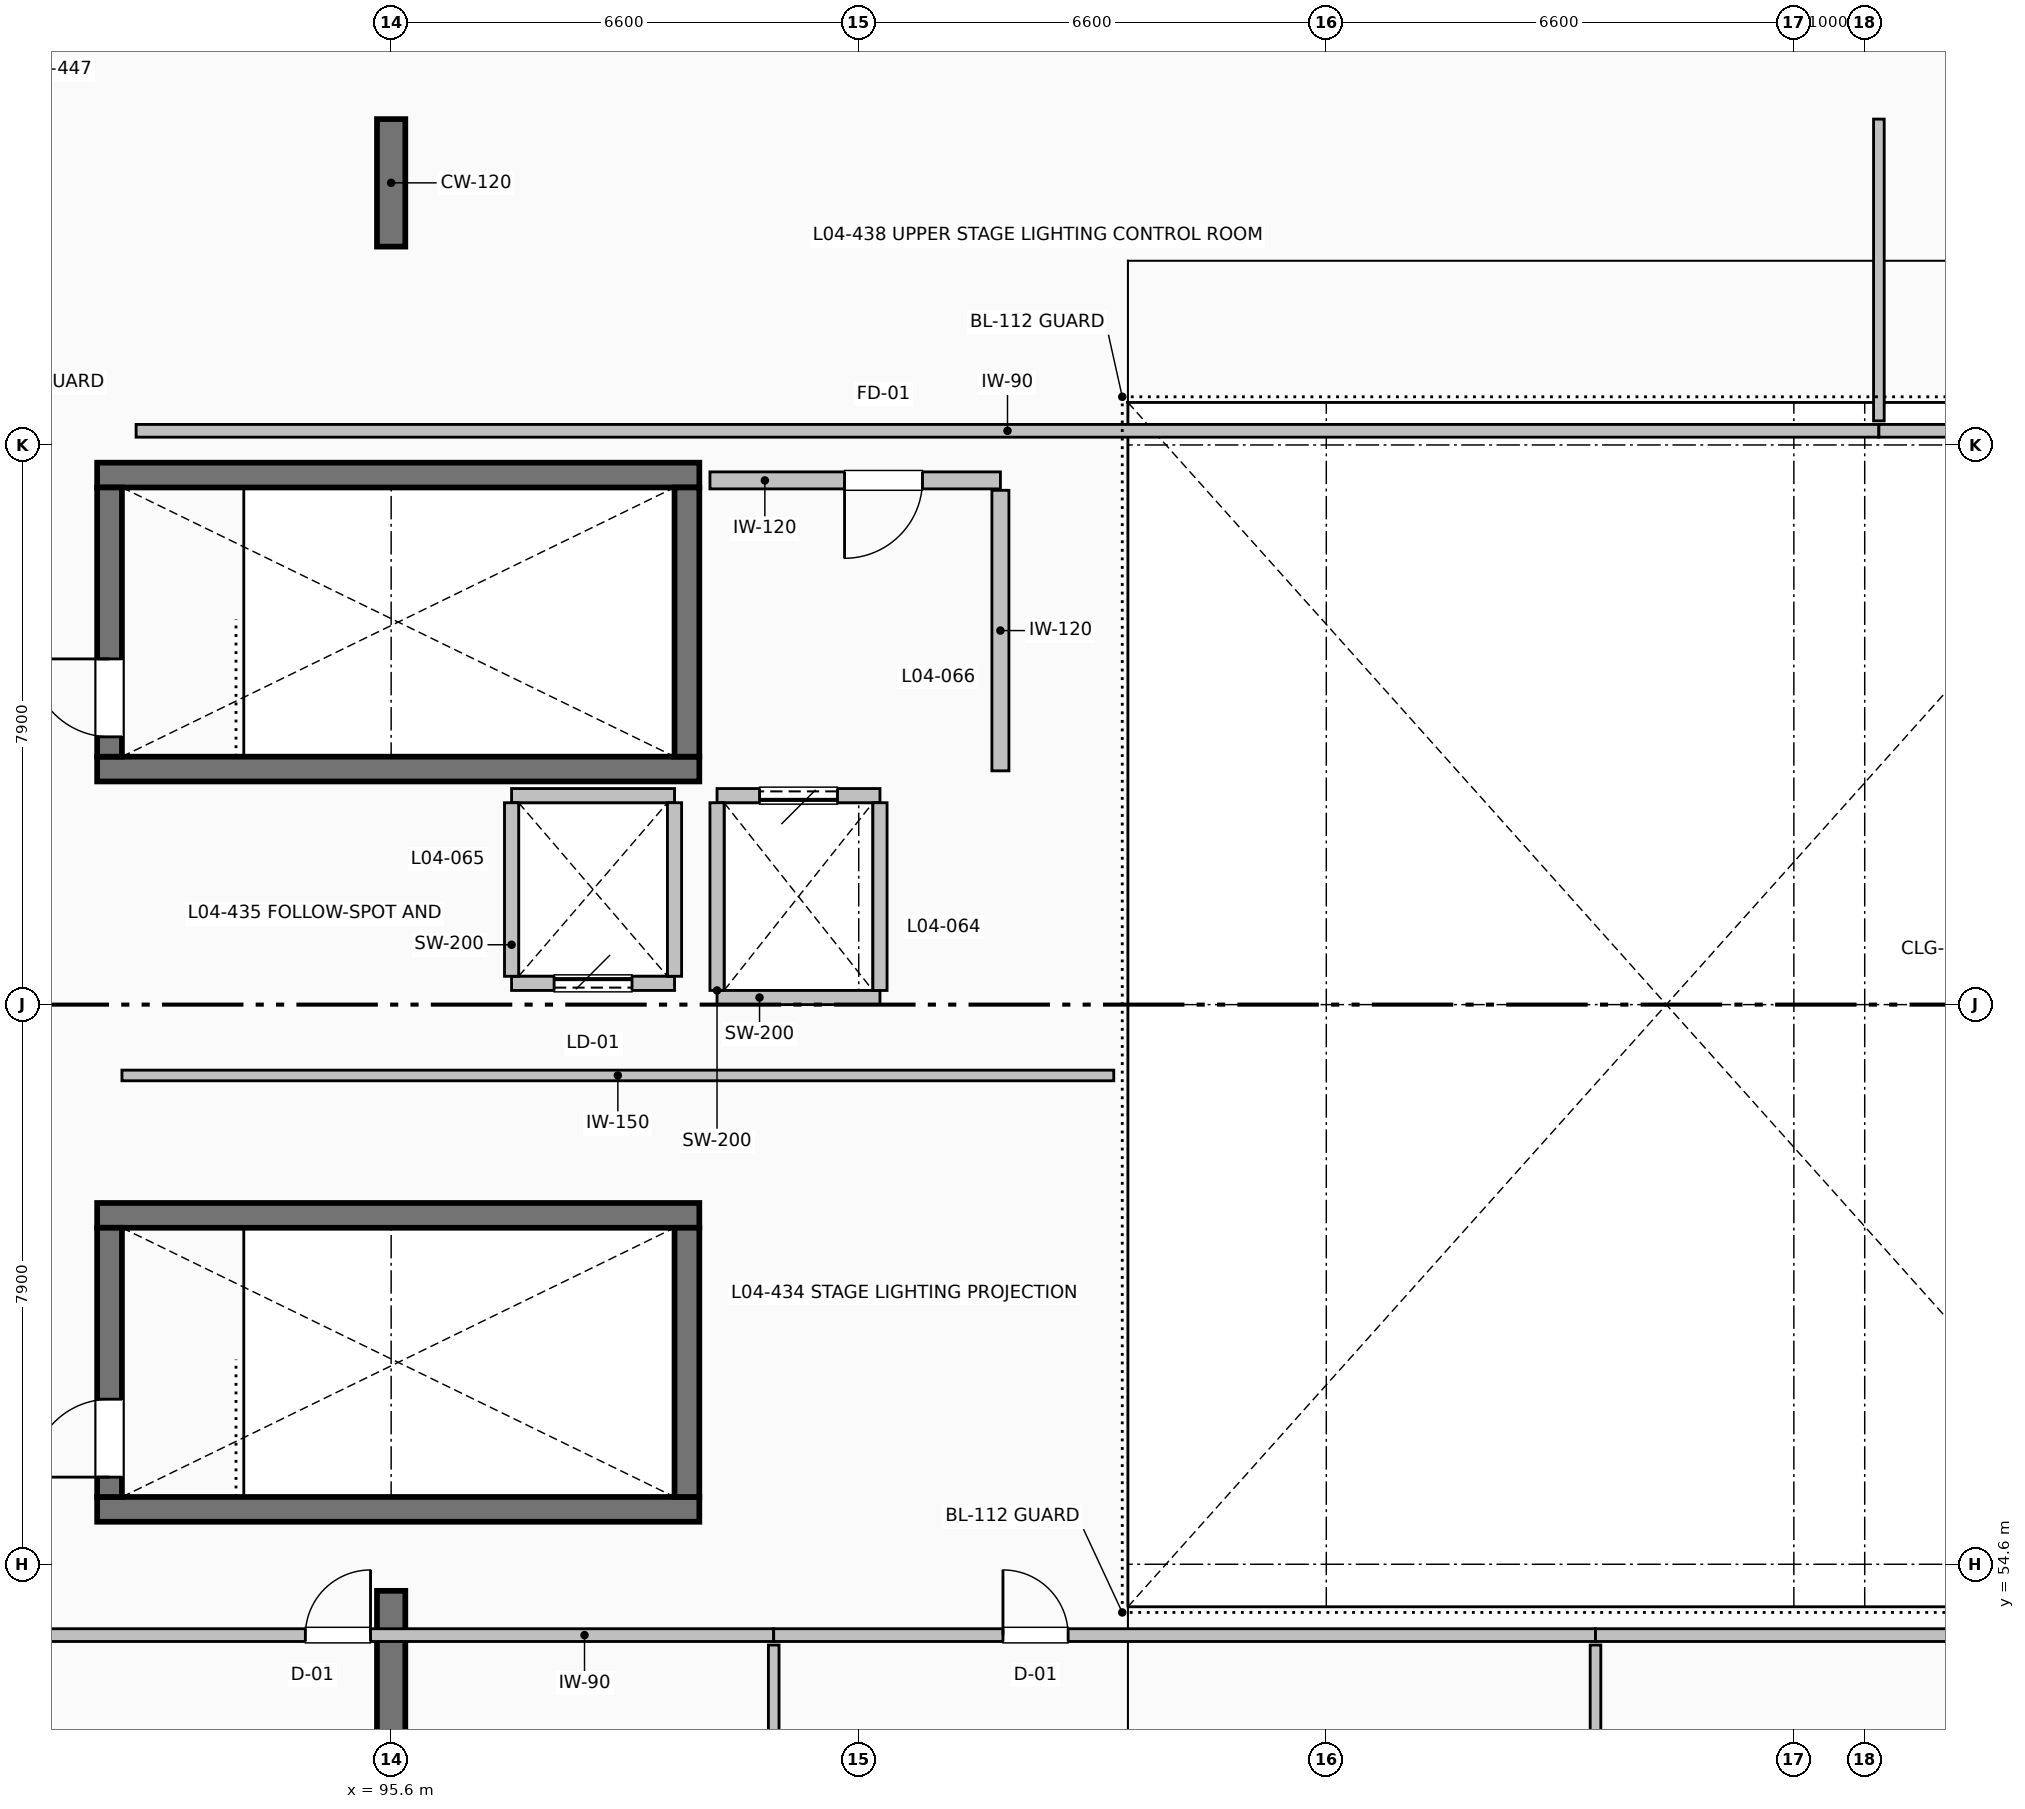
"""IFC4 building model, lengths in metres.
Left out: names, types, materials, properties, quantities, classifications, styles, units other than length and angle.
Written with IfcOpenShell. Run it as: python <this file> out.ifc"""

import sys

from ifc_helpers import new_model, si_unit, direction, frame, frame_2d, origin, place, context, subcontext, project, spatial, rectangle, extrude, element, fill, save


model = new_model("IFC4")
c1 = context("Model", 3, precision=1e-05, world=origin(), true_north=direction((0.0, 1.0)))
c2 = subcontext(c1, "Body", "Model", "MODEL_VIEW")
j1 = project(units=[si_unit("LENGTHUNIT", "METRE"), si_unit("PLANEANGLEUNIT", "RADIAN")], contexts=[c1])
p1 = place(None, origin())
s1 = spatial("IfcSite", under=j1, at=p1, CompositionType="ELEMENT")
p2 = place(p1, origin())
s2 = spatial("IfcBuilding", under=s1, at=p2, CompositionType="ELEMENT")
p3 = place(p2, frame((0.0, 0.0, 19.5)))
s3 = spatial("IfcBuildingStorey", under=s2, at=p3, CompositionType="ELEMENT", Elevation=19.5)
for number, where, z_axis, x_axis in (
    (1, (91.45, 65.825, 0.0), (0.0, 0.0, 1.0), (1.0, 0.0, 0.0)),
    (2, (99.95, 69.975, 0.0), (0.0, 0.0, 1.0), (-1.0, 0.0, 0.0)),
):
    element("IfcWall", number, at=place(p3, frame(where, z_axis=z_axis, x_axis=x_axis)), inside=s3, PredefinedType="SHEAR", context=c2, shape_type="SweptSolid", body=[
        extrude(rectangle(XDim=8.5, YDim=0.35, at=frame_2d((4.25, 0.0))), origin(), (0.0, 0.0, 1.0), 4.22),
    ])
p4 = place(p3, frame((91.625, 66.0, 0.0), z_axis=(0.0, 0.0, 1.0), x_axis=(0.0, 1.0, 0.0)))
e3 = element("IfcWall", 3, at=p4, inside=s3, PredefinedType="SHEAR", context=c2, shape_type="SweptSolid", body=[
    extrude(rectangle(XDim=3.8, YDim=0.35, at=frame_2d((1.9, 0.0))), origin(), (0.0, 0.0, 1.0), 4.22),
])
p5 = place(p4, frame((0.28, 0.0, 0.0)))
e4 = element("IfcOpeningElement", 4, at=p5, cuts=e3, PredefinedType="OPENING", context=c2, shape_type="SweptSolid", body=[
    extrude(rectangle(XDim=1.1, YDim=2.08, at=frame_2d((0.55, 1.04))), frame((0.0, 0.185, 0.0), z_axis=(0.0, -1.0, 0.0), x_axis=(1.0, 0.0, 0.0)), (0.0, 0.0, 1.0), 0.37),
])
p6 = place(p3, frame((99.775, 69.8, 0.0), z_axis=(0.0, 0.0, 1.0), x_axis=(0.0, -1.0, 0.0)))
e5 = element("IfcWall", 5, at=p6, inside=s3, PredefinedType="SHEAR", context=c2, shape_type="SweptSolid", body=[
    extrude(rectangle(XDim=3.8, YDim=0.35, at=frame_2d((1.9, 0.0))), origin(), (0.0, 0.0, 1.0), 4.22),
])
for number, where, z_axis, x_axis in (
    (6, (91.45, 55.375, 0.0), (0.0, 0.0, 1.0), (1.0, 0.0, 0.0)),
    (7, (99.95, 59.525, 0.0), (0.0, 0.0, 1.0), (-1.0, 0.0, 0.0)),
):
    element("IfcWall", number, at=place(p3, frame(where, z_axis=z_axis, x_axis=x_axis)), inside=s3, PredefinedType="SHEAR", context=c2, shape_type="SweptSolid", body=[
        extrude(rectangle(XDim=8.5, YDim=0.35, at=frame_2d((4.25, 0.0))), origin(), (0.0, 0.0, 1.0), 4.22),
    ])
p7 = place(p3, frame((91.625, 55.55, 0.0), z_axis=(0.0, 0.0, 1.0), x_axis=(0.0, 1.0, 0.0)))
e8 = element("IfcWall", 8, at=p7, inside=s3, PredefinedType="SHEAR", context=c2, shape_type="SweptSolid", body=[
    extrude(rectangle(XDim=3.8, YDim=0.35, at=frame_2d((1.9, 0.0))), origin(), (0.0, 0.0, 1.0), 4.22),
])
p8 = place(p7, frame((0.28, 0.0, 0.0)))
e9 = element("IfcOpeningElement", 9, at=p8, cuts=e8, PredefinedType="OPENING", context=c2, shape_type="SweptSolid", body=[
    extrude(rectangle(XDim=1.1, YDim=2.08, at=frame_2d((0.55, 1.04))), frame((0.0, 0.185, 0.0), z_axis=(0.0, -1.0, 0.0), x_axis=(1.0, 0.0, 0.0)), (0.0, 0.0, 1.0), 0.37),
])
p9 = place(p3, frame((99.775, 59.35, 0.0), z_axis=(0.0, 0.0, 1.0), x_axis=(0.0, -1.0, 0.0)))
e10 = element("IfcWall", 10, at=p9, inside=s3, PredefinedType="SHEAR", context=c2, shape_type="SweptSolid", body=[
    extrude(rectangle(XDim=3.8, YDim=0.35, at=frame_2d((1.9, 0.0))), origin(), (0.0, 0.0, 1.0), 4.22),
])
p10 = place(p3, frame((95.6, 73.2, 0.0), z_axis=(0.0, 0.0, 1.0), x_axis=(0.0, 1.0, 0.0)))
e11 = element("IfcWall", 11, at=p10, inside=s3, PredefinedType="SHEAR", context=c2, shape_type="SweptSolid", body=[
    extrude(rectangle(XDim=1.8, YDim=0.4, at=frame_2d((0.9, 0.0))), origin(), (0.0, 0.0, 1.0), 4.18),
])
p11 = place(p3, frame((95.6, 50.65, 0.0), z_axis=(0.0, 0.0, 1.0), x_axis=(0.0, 1.0, 0.0)))
e12 = element("IfcWall", 12, at=p11, inside=s3, PredefinedType="SHEAR", context=c2, shape_type="SweptSolid", body=[
    extrude(rectangle(XDim=3.575, YDim=0.4, at=frame_2d((1.788, 0.0))), origin(), (0.0, 0.0, 1.0), 4.18),
])
p12 = place(p3, frame((100.2, 62.6, 0.0), z_axis=(0.0, 0.0, 1.0), x_axis=(1.0, 0.0, 0.0)))
e13 = element("IfcWall", 13, at=p12, inside=s3, PredefinedType="PARTITIONING", context=c2, shape_type="SweptSolid", body=[
    extrude(rectangle(XDim=2.3, YDim=0.2, at=frame_2d((1.15, 0.0))), origin(), (0.0, 0.0, 1.0), 4.192),
])
p13 = place(p3, frame((102.5, 65.45, 0.0), z_axis=(0.0, 0.0, 1.0), x_axis=(-1.0, 0.0, 0.0)))
e14 = element("IfcWall", 14, at=p13, inside=s3, PredefinedType="PARTITIONING", context=c2, shape_type="SweptSolid", body=[
    extrude(rectangle(XDim=2.3, YDim=0.2, at=frame_2d((1.15, 0.0))), origin(), (0.0, 0.0, 1.0), 4.192),
])
p14 = place(p13, frame((0.6, 0.0, 0.0)))
e15 = element("IfcOpeningElement", 15, at=p14, cuts=e14, PredefinedType="OPENING", context=c2, shape_type="SweptSolid", body=[
    extrude(rectangle(XDim=1.1, YDim=2.15, at=frame_2d((0.55, 1.075))), frame((0.0, 0.11, 0.0), z_axis=(0.0, -1.0, 0.0), x_axis=(1.0, 0.0, 0.0)), (0.0, 0.0, 1.0), 0.22),
])
for number, where, z_axis, x_axis in (
    (16, (100.2, 62.7, 0.0), (0.0, 0.0, 1.0), (0.0, 1.0, 0.0)),
    (17, (102.5, 65.35, 0.0), (0.0, 0.0, 1.0), (0.0, -1.0, 0.0)),
):
    element("IfcWall", number, at=place(p3, frame(where, z_axis=z_axis, x_axis=x_axis)), inside=s3, PredefinedType="PARTITIONING", context=c2, shape_type="SweptSolid", body=[
        extrude(rectangle(XDim=2.65, YDim=0.2, at=frame_2d((1.325, 0.0))), origin(), (0.0, 0.0, 1.0), 4.192),
    ])
p15 = place(p3, frame((97.3, 62.8, 0.0), z_axis=(0.0, 0.0, 1.0), x_axis=(1.0, 0.0, 0.0)))
e18 = element("IfcWall", 18, at=p15, inside=s3, PredefinedType="PARTITIONING", context=c2, shape_type="SweptSolid", body=[
    extrude(rectangle(XDim=2.3, YDim=0.2, at=frame_2d((1.15, 0.0))), origin(), (0.0, 0.0, 1.0), 3.503),
])
p16 = place(p15, frame((0.6, 0.0, 0.0)))
e19 = element("IfcOpeningElement", 19, at=p16, cuts=e18, PredefinedType="OPENING", context=c2, shape_type="SweptSolid", body=[
    extrude(rectangle(XDim=1.1, YDim=2.15, at=frame_2d((0.55, 1.075))), frame((0.0, 0.11, 0.0), z_axis=(0.0, -1.0, 0.0), x_axis=(1.0, 0.0, 0.0)), (0.0, 0.0, 1.0), 0.22),
])
p17 = place(p3, frame((99.6, 65.45, 0.0), z_axis=(0.0, 0.0, 1.0), x_axis=(-1.0, 0.0, 0.0)))
e20 = element("IfcWall", 20, at=p17, inside=s3, PredefinedType="PARTITIONING", context=c2, shape_type="SweptSolid", body=[
    extrude(rectangle(XDim=2.3, YDim=0.2, at=frame_2d((1.15, 0.0))), origin(), (0.0, 0.0, 1.0), 3.503),
])
p18 = place(p3, frame((97.3, 62.9, 0.0), z_axis=(0.0, 0.0, 1.0), x_axis=(0.0, 1.0, 0.0)))
e21 = element("IfcWall", 21, at=p18, inside=s3, PredefinedType="PARTITIONING", context=c2, shape_type="SweptSolid", body=[
    extrude(rectangle(XDim=2.45, YDim=0.2, at=frame_2d((1.225, 0.0))), origin(), (0.0, 0.0, 1.0), 4.192),
])
p19 = place(p3, frame((99.6, 65.35, 0.0), z_axis=(0.0, 0.0, 1.0), x_axis=(0.0, -1.0, 0.0)))
e22 = element("IfcWall", 22, at=p19, inside=s3, PredefinedType="PARTITIONING", context=c2, shape_type="SweptSolid", body=[
    extrude(rectangle(XDim=2.45, YDim=0.2, at=frame_2d((1.225, 0.0))), origin(), (0.0, 0.0, 1.0), 3.503),
])
p20 = place(p3, frame((104.2, 69.9, 0.0), z_axis=(0.0, 0.0, 1.0), x_axis=(-1.0, 0.0, 0.0)))
e23 = element("IfcWall", 23, at=p20, inside=s3, PredefinedType="PARTITIONING", context=c2, shape_type="SweptSolid", body=[
    extrude(rectangle(XDim=4.1, YDim=0.24, at=frame_2d((2.05, 0.0))), origin(), (0.0, 0.0, 1.0), 4.192),
])
p21 = place(p20, frame((1.1, 0.0, 0.0)))
e24 = element("IfcOpeningElement", 24, at=p21, cuts=e23, PredefinedType="OPENING", context=c2, shape_type="SweptSolid", body=[
    extrude(rectangle(XDim=1.1, YDim=2.08, at=frame_2d((0.55, 1.04))), frame((0.0, 0.13, 0.0), z_axis=(0.0, -1.0, 0.0), x_axis=(1.0, 0.0, 0.0)), (0.0, 0.0, 1.0), 0.26),
])
p22 = place(p3, frame((104.2, 69.76, 0.0), z_axis=(0.0, 0.0, 1.0), x_axis=(0.0, -1.0, 0.0)))
e25 = element("IfcWall", 25, at=p22, inside=s3, PredefinedType="PARTITIONING", context=c2, shape_type="SweptSolid", body=[
    extrude(rectangle(XDim=3.96, YDim=0.24, at=frame_2d((1.98, 0.0))), origin(), (0.0, 0.0, 1.0), 4.192),
])
p23 = place(p3, frame((89.4, 53.6, 0.0), z_axis=(0.0, 0.0, 1.0), x_axis=(1.0, 0.0, 0.0)))
e26 = element("IfcWall", 26, at=p23, inside=s3, PredefinedType="PARTITIONING", context=c2, shape_type="SweptSolid", body=[
    extrude(rectangle(XDim=11.6, YDim=0.18, at=frame_2d((5.8, 0.0))), origin(), (0.0, 0.0, 1.0), 3.503),
])
p24 = place(p23, frame((4.989, 0.0, 0.0)))
e27 = element("IfcOpeningElement", 27, at=p24, cuts=e26, PredefinedType="OPENING", context=c2, shape_type="SweptSolid", body=[
    extrude(rectangle(XDim=0.92, YDim=2.05, at=frame_2d((0.46, 1.025))), frame((0.0, 0.1, 0.0), z_axis=(0.0, -1.0, 0.0), x_axis=(1.0, 0.0, 0.0)), (0.0, 0.0, 1.0), 0.2),
])
p25 = place(p3, frame((101.0, 47.0, 0.0), z_axis=(0.0, 0.0, 1.0), x_axis=(0.0, 1.0, 0.0)))
e28 = element("IfcWall", 28, at=p25, inside=s3, PredefinedType="PARTITIONING", context=c2, shape_type="SweptSolid", body=[
    extrude(rectangle(XDim=6.46, YDim=0.15, at=frame_2d((3.23, 0.0))), origin(), (0.0, 0.0, 1.0), 4.192),
])
p26 = place(p3, frame((101.0, 53.6, 0.0), z_axis=(0.0, 0.0, 1.0), x_axis=(1.0, 0.0, 0.0)))
e29 = element("IfcWall", 29, at=p26, inside=s3, PredefinedType="PARTITIONING", context=c2, shape_type="SweptSolid", body=[
    extrude(rectangle(XDim=11.6, YDim=0.18, at=frame_2d((5.8, 0.0))), origin(), (0.0, 0.0, 1.0), 3.503),
])
p27 = place(p26, frame((3.236, 0.0, 0.0)))
e30 = element("IfcOpeningElement", 30, at=p27, cuts=e29, PredefinedType="OPENING", context=c2, shape_type="SweptSolid", body=[
    extrude(rectangle(XDim=0.92, YDim=2.05, at=frame_2d((0.46, 1.025))), frame((0.0, 0.1, 0.0), z_axis=(0.0, -1.0, 0.0), x_axis=(1.0, 0.0, 0.0)), (0.0, 0.0, 1.0), 0.2),
])
p28 = place(p3, frame((112.6, 47.0, 0.0), z_axis=(0.0, 0.0, 1.0), x_axis=(0.0, 1.0, 0.0)))
e31 = element("IfcWall", 31, at=p28, inside=s3, PredefinedType="PARTITIONING", context=c2, shape_type="SweptSolid", body=[
    extrude(rectangle(XDim=6.46, YDim=0.15, at=frame_2d((3.23, 0.0))), origin(), (0.0, 0.0, 1.0), 4.192),
])
p29 = place(p3, frame((112.6, 53.6, 0.0), z_axis=(0.0, 0.0, 1.0), x_axis=(1.0, 0.0, 0.0)))
e32 = element("IfcWall", 32, at=p29, inside=s3, PredefinedType="PARTITIONING", context=c2, shape_type="SweptSolid", body=[
    extrude(rectangle(XDim=11.6, YDim=0.18, at=frame_2d((5.8, 0.0))), origin(), (0.0, 0.0, 1.0), 3.503),
])
p30 = place(p29, frame((9.548, 0.0, 0.0)))
e33 = element("IfcOpeningElement", 33, at=p30, cuts=e32, PredefinedType="OPENING", context=c2, shape_type="SweptSolid", body=[
    extrude(rectangle(XDim=0.92, YDim=2.05, at=frame_2d((0.46, 1.025))), frame((0.0, 0.1, 0.0), z_axis=(0.0, -1.0, 0.0), x_axis=(1.0, 0.0, 0.0)), (0.0, 0.0, 1.0), 0.2),
])
p31 = place(p3, frame((91.8, 61.5, 0.0), z_axis=(0.0, 0.0, 1.0), x_axis=(1.0, 0.0, 0.0)))
e34 = element("IfcWall", 34, at=p31, inside=s3, PredefinedType="PARTITIONING", context=c2, shape_type="SweptSolid", body=[
    extrude(rectangle(XDim=14.0, YDim=0.15, at=frame_2d((7.0, 0.0))), origin(), (0.0, 0.0, 1.0), 3.503),
])
p32 = place(p3, frame((92.0, 70.6, 0.0), z_axis=(0.0, 0.0, 1.0), x_axis=(1.0, 0.0, 0.0)))
e35 = element("IfcWall", 35, at=p32, inside=s3, PredefinedType="PARTITIONING", context=c2, shape_type="SweptSolid", body=[
    extrude(rectangle(XDim=24.6, YDim=0.18, at=frame_2d((12.3, 0.0))), origin(), (0.0, 0.0, 1.0), 3.503),
])
p33 = place(p3, frame((116.6, 70.74, 0.0), z_axis=(0.0, 0.0, 1.0), x_axis=(0.0, 1.0, 0.0)))
e36 = element("IfcWall", 36, at=p33, inside=s3, PredefinedType="PARTITIONING", context=c2, shape_type="SweptSolid", body=[
    extrude(rectangle(XDim=4.26, YDim=0.15, at=frame_2d((2.13, 0.0))), origin(), (0.0, 0.0, 1.0), 4.192),
])
p34 = place(p3, frame((116.6, 70.6, 0.0), z_axis=(0.0, 0.0, 1.0), x_axis=(1.0, 0.0, 0.0)))
e37 = element("IfcWall", 37, at=p34, inside=s3, PredefinedType="PARTITIONING", context=c2, shape_type="SweptSolid", body=[
    extrude(rectangle(XDim=24.6, YDim=0.18, at=frame_2d((12.3, 0.0))), origin(), (0.0, 0.0, 1.0), 3.503),
])
p35 = place(p34, frame((11.66, 0.0, 0.0)))
e38 = element("IfcOpeningElement", 38, at=p35, cuts=e37, PredefinedType="OPENING", context=c2, shape_type="SweptSolid", body=[
    extrude(rectangle(XDim=1.28, YDim=2.14, at=frame_2d((0.64, 1.07))), frame((0.0, 0.1, 0.0), z_axis=(0.0, -1.0, 0.0), x_axis=(1.0, 0.0, 0.0)), (0.0, 0.0, 1.0), 0.2),
])
p36 = place(p5, origin())
e39 = element("IfcDoor", 39, at=p36, inside=s3, OperationType="SINGLE_SWING_RIGHT", PredefinedType="DOOR", context=c2, shape_type="SweptSolid", body=[
    extrude(rectangle(XDim=1.1, YDim=2.08, at=frame_2d((0.55, 1.04))), frame((0.0, 0.025, 0.0), z_axis=(0.0, -1.0, 0.0), x_axis=(1.0, 0.0, 0.0)), (0.0, 0.0, 1.0), 0.05),
])
fill(e4, e39)
p37 = place(p8, origin())
e40 = element("IfcDoor", 40, at=p37, inside=s3, OperationType="SINGLE_SWING_LEFT", PredefinedType="DOOR", context=c2, shape_type="SweptSolid", body=[
    extrude(rectangle(XDim=1.1, YDim=2.08, at=frame_2d((0.55, 1.04))), frame((0.0, 0.025, 0.0), z_axis=(0.0, -1.0, 0.0), x_axis=(1.0, 0.0, 0.0)), (0.0, 0.0, 1.0), 0.05),
])
fill(e9, e40)
p38 = place(p14, origin())
e41 = element("IfcDoor", 41, at=p38, inside=s3, OperationType="SLIDING_TO_LEFT", PredefinedType="DOOR", context=c2, shape_type="SweptSolid", body=[
    extrude(rectangle(XDim=1.1, YDim=2.15, at=frame_2d((0.55, 1.075))), frame((0.0, 0.025, 0.0), z_axis=(0.0, -1.0, 0.0), x_axis=(1.0, 0.0, 0.0)), (0.0, 0.0, 1.0), 0.05),
])
fill(e15, e41)
p39 = place(p16, origin())
e42 = element("IfcDoor", 42, at=p39, inside=s3, OperationType="SLIDING_TO_LEFT", PredefinedType="DOOR", context=c2, shape_type="SweptSolid", body=[
    extrude(rectangle(XDim=1.1, YDim=2.15, at=frame_2d((0.55, 1.075))), frame((0.0, 0.025, 0.0), z_axis=(0.0, -1.0, 0.0), x_axis=(1.0, 0.0, 0.0)), (0.0, 0.0, 1.0), 0.05),
])
fill(e19, e42)
p40 = place(p21, origin())
e43 = element("IfcDoor", 43, at=p40, inside=s3, OperationType="SINGLE_SWING_RIGHT", PredefinedType="DOOR", context=c2, shape_type="SweptSolid", body=[
    extrude(rectangle(XDim=1.1, YDim=2.08, at=frame_2d((0.55, 1.04))), frame((0.0, 0.025, 0.0), z_axis=(0.0, -1.0, 0.0), x_axis=(1.0, 0.0, 0.0)), (0.0, 0.0, 1.0), 0.05),
])
fill(e24, e43)
p41 = place(p24, origin())
e44 = element("IfcDoor", 44, at=p41, inside=s3, OperationType="SINGLE_SWING_RIGHT", PredefinedType="DOOR", context=c2, shape_type="SweptSolid", body=[
    extrude(rectangle(XDim=0.92, YDim=2.05, at=frame_2d((0.46, 1.025))), frame((0.0, 0.025, 0.0), z_axis=(0.0, -1.0, 0.0), x_axis=(1.0, 0.0, 0.0)), (0.0, 0.0, 1.0), 0.05),
])
fill(e27, e44)
p42 = place(p27, origin())
e45 = element("IfcDoor", 45, at=p42, inside=s3, OperationType="SINGLE_SWING_LEFT", PredefinedType="DOOR", context=c2, shape_type="SweptSolid", body=[
    extrude(rectangle(XDim=0.92, YDim=2.05, at=frame_2d((0.46, 1.025))), frame((0.0, 0.025, 0.0), z_axis=(0.0, -1.0, 0.0), x_axis=(1.0, 0.0, 0.0)), (0.0, 0.0, 1.0), 0.05),
])
fill(e30, e45)
save(model, sys.argv[1])
